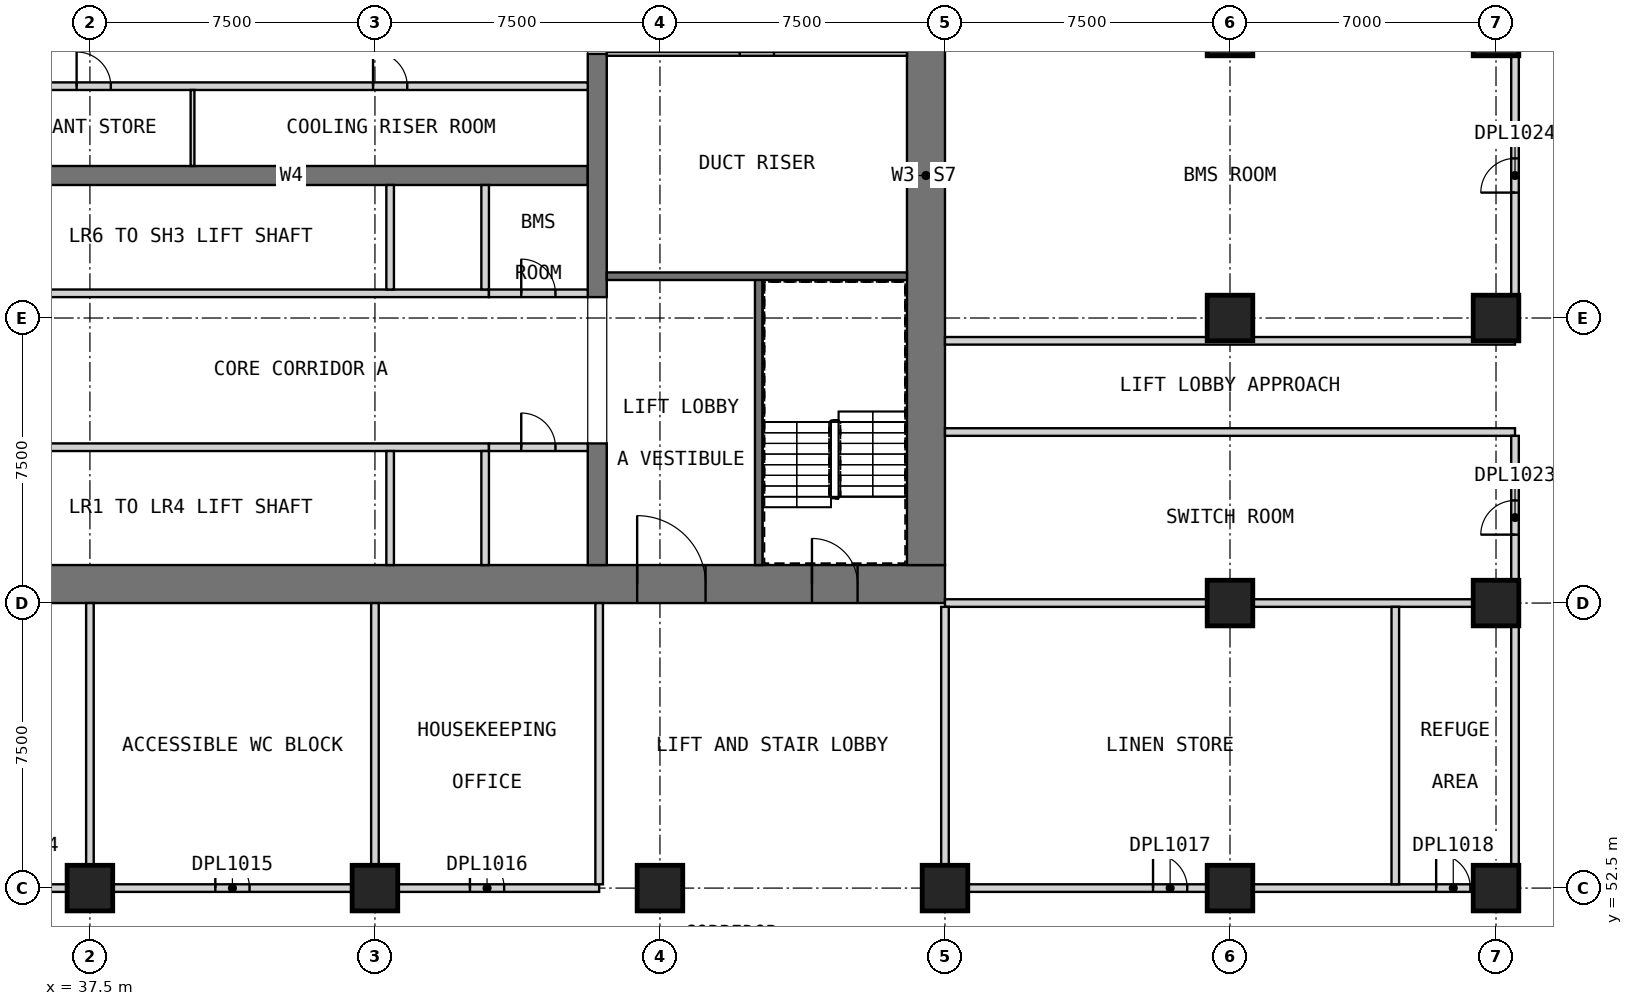
"""IFC4 building model, lengths in metres.
Left out: names, types, materials, properties, quantities, classifications, styles, units other than length and angle.
Written with IfcOpenShell. Run it as: python <this file> out.ifc"""

import sys

from ifc_helpers import new_model, si_unit, direction, frame, frame_2d, origin, origin_2d, place, context, subcontext, project, spatial, rectangle, extrude, element, fill, save


model = new_model("IFC4")
c1 = context("Model", 3, precision=1e-05, world=origin(), true_north=direction((0.0, 1.0)))
c2 = subcontext(c1, "Body", "Model", "MODEL_VIEW")
j1 = project(units=[si_unit("LENGTHUNIT", "METRE"), si_unit("PLANEANGLEUNIT", "RADIAN")], contexts=[c1])
p1 = place(None, origin())
s1 = spatial("IfcSite", under=j1, at=p1, CompositionType="ELEMENT")
p2 = place(p1, origin())
s2 = spatial("IfcBuilding", under=s1, at=p2, CompositionType="ELEMENT")
p3 = place(p2, frame((0.0, 0.0, 73.6)))
s3 = spatial("IfcBuildingStorey", under=s2, at=p3, CompositionType="ELEMENT", Elevation=73.6)
for number, where, z_axis, x_axis in (
    (1, (37.5, 52.5, 0.0), (0.0, 0.0, 1.0), (1.0, 0.0, 0.0)),
    (2, (45.0, 52.5, 0.0), (0.0, 0.0, 1.0), (1.0, 0.0, 0.0)),
    (3, (52.5, 52.5, 0.0), (0.0, 0.0, 1.0), (1.0, 0.0, 0.0)),
    (4, (60.0, 52.5, 0.0), (0.0, 0.0, 1.0), (1.0, 0.0, 0.0)),
    (5, (67.5, 52.5, 0.0), (0.0, 0.0, 1.0), (1.0, 0.0, 0.0)),
    (6, (67.5, 60.0, 0.0), (0.0, 0.0, 1.0), (1.0, 0.0, 0.0)),
    (7, (67.5, 67.5, 0.0), (0.0, 0.0, 1.0), (1.0, 0.0, 0.0)),
    (8, (67.5, 75.0, 0.0), (0.0, 0.0, 1.0), (1.0, 0.0, 0.0)),
    (9, (74.5, 52.5, 0.0), (0.0, 0.0, 1.0), (1.0, 0.0, 0.0)),
    (10, (74.5, 60.0, 0.0), (0.0, 0.0, 1.0), (1.0, 0.0, 0.0)),
    (11, (74.5, 67.5, 0.0), (0.0, 0.0, 1.0), (1.0, 0.0, 0.0)),
    (12, (74.5, 75.0, 0.0), (0.0, 0.0, 1.0), (1.0, 0.0, 0.0)),
):
    element("IfcColumn", number, at=place(p3, frame(where, z_axis=z_axis, x_axis=x_axis)), inside=s3, PredefinedType="COLUMN", context=c2, shape_type="SweptSolid", body=[
        extrude(rectangle(XDim=1.2, YDim=1.2, at=origin_2d()), origin(), (0.0, 0.0, 1.0), 5.5),
    ])
p4 = place(p3, frame((30.0, 60.5, 0.0), z_axis=(0.0, 0.0, 1.0), x_axis=(1.0, 0.0, 0.0)))
e13 = element("IfcWall", 13, at=p4, inside=s3, PredefinedType="SHEAR", context=c2, shape_type="SweptSolid", body=[
    extrude(rectangle(XDim=30.0, YDim=1.0, at=frame_2d((15.0, 0.0))), origin(), (0.0, 0.0, 1.0), 5.5),
])
p5 = place(p4, frame((21.9, 0.0, 0.0)))
e14 = element("IfcOpeningElement", 14, at=p5, cuts=e13, PredefinedType="OPENING", context=c2, shape_type="SweptSolid", body=[
    extrude(rectangle(XDim=1.8, YDim=2.1, at=frame_2d((0.9, 1.05))), frame((0.0, 0.51, 0.0), z_axis=(0.0, -1.0, 0.0), x_axis=(1.0, 0.0, 0.0)), (0.0, 0.0, 1.0), 1.02),
])
p6 = place(p4, frame((26.5, 0.0, 0.0)))
e15 = element("IfcOpeningElement", 15, at=p6, cuts=e13, PredefinedType="OPENING", context=c2, shape_type="SweptSolid", body=[
    extrude(rectangle(XDim=1.2, YDim=2.1, at=frame_2d((0.6, 1.05))), frame((0.0, 0.51, 0.0), z_axis=(0.0, -1.0, 0.0), x_axis=(1.0, 0.0, 0.0)), (0.0, 0.0, 1.0), 1.02),
])
p7 = place(p3, frame((59.5, 61.0, 0.0), z_axis=(0.0, 0.0, 1.0), x_axis=(0.0, 1.0, 0.0)))
e16 = element("IfcWall", 16, at=p7, inside=s3, PredefinedType="SHEAR", context=c2, shape_type="SweptSolid", body=[
    extrude(rectangle(XDim=20.5, YDim=1.0, at=frame_2d((10.25, 0.0))), origin(), (0.0, 0.0, 1.0), 5.5),
])
p8 = place(p7, frame((14.5, 0.0, 0.0)))
e17 = element("IfcOpeningElement", 17, at=p8, cuts=e16, PredefinedType="OPENING", context=c2, shape_type="SweptSolid", body=[
    extrude(rectangle(XDim=1.8, YDim=2.1, at=frame_2d((0.9, 1.05))), frame((0.0, 0.51, 0.0), z_axis=(0.0, -1.0, 0.0), x_axis=(1.0, 0.0, 0.0)), (0.0, 0.0, 1.0), 1.02),
])
p9 = place(p3, frame((35.0, 71.25, 0.0), z_axis=(0.0, 0.0, 1.0), x_axis=(1.0, 0.0, 0.0)))
e18 = element("IfcWall", 18, at=p9, inside=s3, PredefinedType="SHEAR", context=c2, shape_type="SweptSolid", body=[
    extrude(rectangle(XDim=15.6, YDim=0.5, at=frame_2d((7.8, 0.0))), origin(), (0.0, 0.0, 1.0), 5.5),
])
p10 = place(p3, frame((50.85, 61.0, 0.0), z_axis=(0.0, 0.0, 1.0), x_axis=(0.0, 1.0, 0.0)))
e19 = element("IfcWall", 19, at=p10, inside=s3, PredefinedType="SHEAR", context=c2, shape_type="SweptSolid", body=[
    extrude(rectangle(XDim=3.2, YDim=0.5, at=frame_2d((1.6, 0.0))), origin(), (0.0, 0.0, 1.0), 5.5),
])
p11 = place(p3, frame((50.85, 68.05, 0.0), z_axis=(0.0, 0.0, 1.0), x_axis=(0.0, 1.0, 0.0)))
e20 = element("IfcWall", 20, at=p11, inside=s3, PredefinedType="SHEAR", context=c2, shape_type="SweptSolid", body=[
    extrude(rectangle(XDim=6.4, YDim=0.5, at=frame_2d((3.2, 0.0))), origin(), (0.0, 0.0, 1.0), 5.5),
])
p12 = place(p3, frame((35.0, 64.1, 0.0), z_axis=(0.0, 0.0, 1.0), x_axis=(1.0, 0.0, 0.0)))
e21 = element("IfcWall", 21, at=p12, inside=s3, PredefinedType="SOLIDWALL", context=c2, shape_type="SweptSolid", body=[
    extrude(rectangle(XDim=13.0, YDim=0.2, at=frame_2d((6.5, 0.0))), origin(), (0.0, 0.0, 1.0), 5.5),
])
for number, where, z_axis, x_axis in (
    (22, (45.4, 61.0, 0.0), (0.0, 0.0, 1.0), (0.0, 1.0, 0.0)),
    (23, (47.9, 61.0, 0.0), (0.0, 0.0, 1.0), (0.0, 1.0, 0.0)),
):
    element("IfcWall", number, at=place(p3, frame(where, z_axis=z_axis, x_axis=x_axis)), inside=s3, PredefinedType="SOLIDWALL", context=c2, shape_type="SweptSolid", body=[
        extrude(rectangle(XDim=3.0, YDim=0.2, at=frame_2d((1.5, 0.0))), origin(), (0.0, 0.0, 1.0), 5.5),
    ])
p13 = place(p3, frame((48.0, 64.1, 0.0), z_axis=(0.0, 0.0, 1.0), x_axis=(1.0, 0.0, 0.0)))
e24 = element("IfcWall", 24, at=p13, inside=s3, PredefinedType="PARTITIONING", context=c2, shape_type="SweptSolid", body=[
    extrude(rectangle(XDim=2.6, YDim=0.2, at=frame_2d((1.3, 0.0))), origin(), (0.0, 0.0, 1.0), 5.25),
])
p14 = place(p13, frame((0.85, 0.0, 0.0)))
e25 = element("IfcOpeningElement", 25, at=p14, cuts=e24, PredefinedType="OPENING", context=c2, shape_type="SweptSolid", body=[
    extrude(rectangle(XDim=0.9, YDim=2.1, at=frame_2d((0.45, 1.05))), frame((0.0, 0.11, 0.0), z_axis=(0.0, -1.0, 0.0), x_axis=(1.0, 0.0, 0.0)), (0.0, 0.0, 1.0), 0.22),
])
p15 = place(p3, frame((35.0, 68.15, 0.0), z_axis=(0.0, 0.0, 1.0), x_axis=(1.0, 0.0, 0.0)))
e26 = element("IfcWall", 26, at=p15, inside=s3, PredefinedType="SOLIDWALL", context=c2, shape_type="SweptSolid", body=[
    extrude(rectangle(XDim=13.0, YDim=0.2, at=frame_2d((6.5, 0.0))), origin(), (0.0, 0.0, 1.0), 5.5),
])
for number, where, z_axis, x_axis in (
    (27, (45.4, 68.25, 0.0), (0.0, 0.0, 1.0), (0.0, 1.0, 0.0)),
    (28, (47.9, 68.25, 0.0), (0.0, 0.0, 1.0), (0.0, 1.0, 0.0)),
):
    element("IfcWall", number, at=place(p3, frame(where, z_axis=z_axis, x_axis=x_axis)), inside=s3, PredefinedType="SOLIDWALL", context=c2, shape_type="SweptSolid", body=[
        extrude(rectangle(XDim=2.75, YDim=0.2, at=frame_2d((1.375, 0.0))), origin(), (0.0, 0.0, 1.0), 5.5),
    ])
p16 = place(p3, frame((48.0, 68.15, 0.0), z_axis=(0.0, 0.0, 1.0), x_axis=(1.0, 0.0, 0.0)))
e29 = element("IfcWall", 29, at=p16, inside=s3, PredefinedType="PARTITIONING", context=c2, shape_type="SweptSolid", body=[
    extrude(rectangle(XDim=2.6, YDim=0.2, at=frame_2d((1.3, 0.0))), origin(), (0.0, 0.0, 1.0), 5.25),
])
p17 = place(p16, frame((0.85, 0.0, 0.0)))
e30 = element("IfcOpeningElement", 30, at=p17, cuts=e29, PredefinedType="OPENING", context=c2, shape_type="SweptSolid", body=[
    extrude(rectangle(XDim=0.9, YDim=2.1, at=frame_2d((0.45, 1.05))), frame((0.0, 0.11, 0.0), z_axis=(0.0, -1.0, 0.0), x_axis=(1.0, 0.0, 0.0)), (0.0, 0.0, 1.0), 0.22),
])
p18 = place(p3, frame((35.0, 73.6, 0.0), z_axis=(0.0, 0.0, 1.0), x_axis=(1.0, 0.0, 0.0)))
e31 = element("IfcWall", 31, at=p18, inside=s3, PredefinedType="PARTITIONING", context=c2, shape_type="SweptSolid", body=[
    extrude(rectangle(XDim=15.6, YDim=0.2, at=frame_2d((7.8, 0.0))), origin(), (0.0, 0.0, 1.0), 5.25),
])
p19 = place(p18, frame((2.15, 0.0, 0.0)))
e32 = element("IfcOpeningElement", 32, at=p19, cuts=e31, PredefinedType="OPENING", context=c2, shape_type="SweptSolid", body=[
    extrude(rectangle(XDim=0.9, YDim=2.1, at=frame_2d((0.45, 1.05))), frame((0.0, 0.11, 0.0), z_axis=(0.0, -1.0, 0.0), x_axis=(1.0, 0.0, 0.0)), (0.0, 0.0, 1.0), 0.22),
])
p20 = place(p18, frame((9.95, 0.0, 0.0)))
e33 = element("IfcOpeningElement", 33, at=p20, cuts=e31, PredefinedType="OPENING", context=c2, shape_type="SweptSolid", body=[
    extrude(rectangle(XDim=0.9, YDim=2.1, at=frame_2d((0.45, 1.05))), frame((0.0, 0.11, 0.0), z_axis=(0.0, -1.0, 0.0), x_axis=(1.0, 0.0, 0.0)), (0.0, 0.0, 1.0), 0.22),
])
p21 = place(p3, frame((40.2, 71.5, 0.0), z_axis=(0.0, 0.0, 1.0), x_axis=(0.0, 1.0, 0.0)))
e34 = element("IfcWall", 34, at=p21, inside=s3, PredefinedType="PARTITIONING", context=c2, shape_type="SweptSolid", body=[
    extrude(rectangle(XDim=2.0, YDim=0.1, at=frame_2d((1.0, 0.0))), origin(), (0.0, 0.0, 1.0), 5.25),
])
p22 = place(p3, frame((55.1, 61.0, 0.0), z_axis=(0.0, 0.0, 1.0), x_axis=(0.0, 1.0, 0.0)))
e35 = element("IfcWall", 35, at=p22, inside=s3, PredefinedType="SOLIDWALL", context=c2, shape_type="SweptSolid", body=[
    extrude(rectangle(XDim=7.6, YDim=0.2, at=frame_2d((3.8, 0.0))), origin(), (0.0, 0.0, 1.0), 5.25),
])
p23 = place(p3, frame((51.1, 68.6, 0.0), z_axis=(0.0, 0.0, 1.0), x_axis=(1.0, 0.0, 0.0)))
e36 = element("IfcWall", 36, at=p23, inside=s3, PredefinedType="SOLIDWALL", context=c2, shape_type="SweptSolid", body=[
    extrude(rectangle(XDim=7.9, YDim=0.2, at=frame_2d((3.95, 0.0))), origin(), (0.0, 0.0, 1.0), 5.25),
])
p24 = place(p3, frame((51.1, 74.45, 0.0), z_axis=(0.0, 0.0, 1.0), x_axis=(1.0, 0.0, 0.0)))
e37 = element("IfcWall", 37, at=p24, inside=s3, PredefinedType="PARTITIONING", context=c2, shape_type="SweptSolid", body=[
    extrude(rectangle(XDim=7.9, YDim=0.1, at=frame_2d((3.95, 0.0))), origin(), (0.0, 0.0, 1.0), 5.25),
])
p25 = place(p24, frame((3.5, 0.0, 0.0)))
e38 = element("IfcOpeningElement", 38, at=p25, cuts=e37, PredefinedType="OPENING", context=c2, shape_type="SweptSolid", body=[
    extrude(rectangle(XDim=0.9, YDim=2.1, at=frame_2d((0.45, 1.05))), frame((0.0, 0.06, 0.0), z_axis=(0.0, -1.0, 0.0), x_axis=(1.0, 0.0, 0.0)), (0.0, 0.0, 1.0), 0.12),
])
p26 = place(p3, frame((30.0, 52.5, 0.0), z_axis=(0.0, 0.0, 1.0), x_axis=(1.0, 0.0, 0.0)))
e39 = element("IfcWall", 39, at=p26, inside=s3, PredefinedType="PARTITIONING", context=c2, shape_type="SweptSolid", body=[
    extrude(rectangle(XDim=20.9, YDim=0.2, at=frame_2d((10.45, 0.0))), origin(), (0.0, 0.0, 1.0), 5.25),
])
p27 = place(p26, frame((5.175, 0.0, 0.0)))
e40 = element("IfcOpeningElement", 40, at=p27, cuts=e39, PredefinedType="OPENING", context=c2, shape_type="SweptSolid", body=[
    extrude(rectangle(XDim=0.9, YDim=2.1, at=frame_2d((0.45, 1.05))), frame((0.0, 0.11, 0.0), z_axis=(0.0, -1.0, 0.0), x_axis=(1.0, 0.0, 0.0)), (0.0, 0.0, 1.0), 0.22),
])
p28 = place(p26, frame((10.8, 0.0, 0.0)))
e41 = element("IfcOpeningElement", 41, at=p28, cuts=e39, PredefinedType="OPENING", context=c2, shape_type="SweptSolid", body=[
    extrude(rectangle(XDim=0.9, YDim=2.1, at=frame_2d((0.45, 1.05))), frame((0.0, 0.11, 0.0), z_axis=(0.0, -1.0, 0.0), x_axis=(1.0, 0.0, 0.0)), (0.0, 0.0, 1.0), 0.22),
])
p29 = place(p26, frame((17.5, 0.0, 0.0)))
e42 = element("IfcOpeningElement", 42, at=p29, cuts=e39, PredefinedType="OPENING", context=c2, shape_type="SweptSolid", body=[
    extrude(rectangle(XDim=0.9, YDim=2.1, at=frame_2d((0.45, 1.05))), frame((0.0, 0.11, 0.0), z_axis=(0.0, -1.0, 0.0), x_axis=(1.0, 0.0, 0.0)), (0.0, 0.0, 1.0), 0.22),
])
p30 = place(p3, frame((60.0, 52.5, 0.0), z_axis=(0.0, 0.0, 1.0), x_axis=(1.0, 0.0, 0.0)))
e43 = element("IfcWall", 43, at=p30, inside=s3, PredefinedType="PARTITIONING", context=c2, shape_type="SweptSolid", body=[
    extrude(rectangle(XDim=15.0, YDim=0.2, at=frame_2d((7.5, 0.0))), origin(), (0.0, 0.0, 1.0), 5.25),
])
p31 = place(p30, frame((5.475, 0.0, 0.0)))
e44 = element("IfcOpeningElement", 44, at=p31, cuts=e43, PredefinedType="OPENING", context=c2, shape_type="SweptSolid", body=[
    extrude(rectangle(XDim=0.9, YDim=2.1, at=frame_2d((0.45, 1.05))), frame((0.0, 0.11, 0.0), z_axis=(0.0, -1.0, 0.0), x_axis=(1.0, 0.0, 0.0)), (0.0, 0.0, 1.0), 0.22),
])
p32 = place(p30, frame((12.925, 0.0, 0.0)))
e45 = element("IfcOpeningElement", 45, at=p32, cuts=e43, PredefinedType="OPENING", context=c2, shape_type="SweptSolid", body=[
    extrude(rectangle(XDim=0.9, YDim=2.1, at=frame_2d((0.45, 1.05))), frame((0.0, 0.11, 0.0), z_axis=(0.0, -1.0, 0.0), x_axis=(1.0, 0.0, 0.0)), (0.0, 0.0, 1.0), 0.22),
])
p33 = place(p3, frame((60.0, 60.0, 0.0), z_axis=(0.0, 0.0, 1.0), x_axis=(1.0, 0.0, 0.0)))
e46 = element("IfcWall", 46, at=p33, inside=s3, PredefinedType="PARTITIONING", context=c2, shape_type="SweptSolid", body=[
    extrude(rectangle(XDim=14.9, YDim=0.2, at=frame_2d((7.45, 0.0))), origin(), (0.0, 0.0, 1.0), 5.25),
])
for number, where, z_axis, x_axis in (
    (47, (60.0, 64.5, 0.0), (0.0, 0.0, 1.0), (1.0, 0.0, 0.0)),
    (48, (60.0, 66.9, 0.0), (0.0, 0.0, 1.0), (1.0, 0.0, 0.0)),
):
    element("IfcWall", number, at=place(p3, frame(where, z_axis=z_axis, x_axis=x_axis)), inside=s3, PredefinedType="PARTITIONING", context=c2, shape_type="SweptSolid", body=[
        extrude(rectangle(XDim=15.0, YDim=0.2, at=frame_2d((7.5, 0.0))), origin(), (0.0, 0.0, 1.0), 5.25),
    ])
for number, where, z_axis, x_axis in (
    (49, (37.5, 52.6, 0.0), (0.0, 0.0, 1.0), (0.0, 1.0, 0.0)),
    (50, (45.0, 52.6, 0.0), (0.0, 0.0, 1.0), (0.0, 1.0, 0.0)),
    (51, (50.9, 52.6, 0.0), (0.0, 0.0, 1.0), (0.0, 1.0, 0.0)),
):
    element("IfcWall", number, at=place(p3, frame(where, z_axis=z_axis, x_axis=x_axis)), inside=s3, PredefinedType="PARTITIONING", context=c2, shape_type="SweptSolid", body=[
        extrude(rectangle(XDim=7.4, YDim=0.2, at=frame_2d((3.7, 0.0))), origin(), (0.0, 0.0, 1.0), 5.25),
    ])
for number, where, z_axis, x_axis in (
    (52, (60.0, 52.6, 0.0), (0.0, 0.0, 1.0), (0.0, 1.0, 0.0)),
    (53, (71.85, 52.6, 0.0), (0.0, 0.0, 1.0), (0.0, 1.0, 0.0)),
):
    element("IfcWall", number, at=place(p3, frame(where, z_axis=z_axis, x_axis=x_axis)), inside=s3, PredefinedType="PARTITIONING", context=c2, shape_type="SweptSolid", body=[
        extrude(rectangle(XDim=7.3, YDim=0.2, at=frame_2d((3.65, 0.0))), origin(), (0.0, 0.0, 1.0), 5.25),
    ])
p34 = place(p3, frame((75.0, 52.6, 0.0), z_axis=(0.0, 0.0, 1.0), x_axis=(0.0, 1.0, 0.0)))
e54 = element("IfcWall", 54, at=p34, inside=s3, PredefinedType="PARTITIONING", context=c2, shape_type="SweptSolid", body=[
    extrude(rectangle(XDim=11.8, YDim=0.2, at=frame_2d((5.9, 0.0))), origin(), (0.0, 0.0, 1.0), 5.25),
])
p35 = place(p34, frame((9.2, 0.0, 0.0)))
e55 = element("IfcOpeningElement", 55, at=p35, cuts=e54, PredefinedType="OPENING", context=c2, shape_type="SweptSolid", body=[
    extrude(rectangle(XDim=0.9, YDim=2.1, at=frame_2d((0.45, 1.05))), frame((0.0, 0.11, 0.0), z_axis=(0.0, -1.0, 0.0), x_axis=(1.0, 0.0, 0.0)), (0.0, 0.0, 1.0), 0.22),
])
p36 = place(p3, frame((75.0, 67.0, 0.0), z_axis=(0.0, 0.0, 1.0), x_axis=(0.0, 1.0, 0.0)))
e56 = element("IfcWall", 56, at=p36, inside=s3, PredefinedType="PARTITIONING", context=c2, shape_type="SweptSolid", body=[
    extrude(rectangle(XDim=8.5, YDim=0.2, at=frame_2d((4.25, 0.0))), origin(), (0.0, 0.0, 1.0), 5.25),
])
p37 = place(p36, frame((3.8, 0.0, 0.0)))
e57 = element("IfcOpeningElement", 57, at=p37, cuts=e56, PredefinedType="OPENING", context=c2, shape_type="SweptSolid", body=[
    extrude(rectangle(XDim=0.9, YDim=2.1, at=frame_2d((0.45, 1.05))), frame((0.0, 0.11, 0.0), z_axis=(0.0, -1.0, 0.0), x_axis=(1.0, 0.0, 0.0)), (0.0, 0.0, 1.0), 0.22),
])
p38 = place(p14, origin())
e58 = element("IfcDoor", 58, at=p38, inside=s3, OperationType="SINGLE_SWING_LEFT", PredefinedType="DOOR", context=c2, shape_type="SweptSolid", body=[
    extrude(rectangle(XDim=0.9, YDim=2.1, at=frame_2d((0.45, 1.05))), frame((0.0, 0.025, 0.0), z_axis=(0.0, -1.0, 0.0), x_axis=(1.0, 0.0, 0.0)), (0.0, 0.0, 1.0), 0.05),
])
fill(e25, e58)
p39 = place(p17, origin())
e59 = element("IfcDoor", 59, at=p39, inside=s3, OperationType="SINGLE_SWING_LEFT", PredefinedType="DOOR", context=c2, shape_type="SweptSolid", body=[
    extrude(rectangle(XDim=0.9, YDim=2.1, at=frame_2d((0.45, 1.05))), frame((0.0, 0.025, 0.0), z_axis=(0.0, -1.0, 0.0), x_axis=(1.0, 0.0, 0.0)), (0.0, 0.0, 1.0), 0.05),
])
fill(e30, e59)
p40 = place(p19, origin())
e60 = element("IfcDoor", 60, at=p40, inside=s3, OperationType="SINGLE_SWING_LEFT", PredefinedType="DOOR", context=c2, shape_type="SweptSolid", body=[
    extrude(rectangle(XDim=0.9, YDim=2.1, at=frame_2d((0.45, 1.05))), frame((0.0, 0.025, 0.0), z_axis=(0.0, -1.0, 0.0), x_axis=(1.0, 0.0, 0.0)), (0.0, 0.0, 1.0), 0.05),
])
fill(e32, e60)
p41 = place(p20, origin())
e61 = element("IfcDoor", 61, at=p41, inside=s3, OperationType="SINGLE_SWING_RIGHT", PredefinedType="DOOR", context=c2, shape_type="SweptSolid", body=[
    extrude(rectangle(XDim=0.9, YDim=2.1, at=frame_2d((0.45, 1.05))), frame((0.0, 0.025, 0.0), z_axis=(0.0, -1.0, 0.0), x_axis=(1.0, 0.0, 0.0)), (0.0, 0.0, 1.0), 0.05),
])
fill(e33, e61)
p42 = place(p5, origin())
e62 = element("IfcDoor", 62, at=p42, inside=s3, OperationType="DOUBLE_DOOR_SINGLE_SWING", PredefinedType="DOOR", context=c2, shape_type="SweptSolid", body=[
    extrude(rectangle(XDim=1.8, YDim=2.1, at=frame_2d((0.9, 1.05))), frame((0.0, 0.025, 0.0), z_axis=(0.0, -1.0, 0.0), x_axis=(1.0, 0.0, 0.0)), (0.0, 0.0, 1.0), 0.05),
])
fill(e14, e62)
p43 = place(p6, origin())
e63 = element("IfcDoor", 63, at=p43, inside=s3, OperationType="SINGLE_SWING_LEFT", PredefinedType="DOOR", context=c2, shape_type="SweptSolid", body=[
    extrude(rectangle(XDim=1.2, YDim=2.1, at=frame_2d((0.6, 1.05))), frame((0.0, 0.025, 0.0), z_axis=(0.0, -1.0, 0.0), x_axis=(1.0, 0.0, 0.0)), (0.0, 0.0, 1.0), 0.05),
])
fill(e15, e63)
p44 = place(p25, origin())
e64 = element("IfcDoor", 64, at=p44, inside=s3, OperationType="SINGLE_SWING_LEFT", PredefinedType="DOOR", context=c2, shape_type="SweptSolid", body=[
    extrude(rectangle(XDim=0.9, YDim=2.1, at=frame_2d((0.45, 1.05))), frame((0.0, 0.025, 0.0), z_axis=(0.0, -1.0, 0.0), x_axis=(1.0, 0.0, 0.0)), (0.0, 0.0, 1.0), 0.05),
])
fill(e38, e64)
p45 = place(p28, origin())
e65 = element("IfcDoor", 65, at=p45, inside=s3, OperationType="SINGLE_SWING_LEFT", PredefinedType="DOOR", context=c2, shape_type="SweptSolid", body=[
    extrude(rectangle(XDim=0.9, YDim=2.1, at=frame_2d((0.45, 1.05))), frame((0.0, 0.025, 0.0), z_axis=(0.0, -1.0, 0.0), x_axis=(1.0, 0.0, 0.0)), (0.0, 0.0, 1.0), 0.05),
])
fill(e41, e65)
p46 = place(p29, origin())
e66 = element("IfcDoor", 66, at=p46, inside=s3, OperationType="SINGLE_SWING_LEFT", PredefinedType="DOOR", context=c2, shape_type="SweptSolid", body=[
    extrude(rectangle(XDim=0.9, YDim=2.1, at=frame_2d((0.45, 1.05))), frame((0.0, 0.025, 0.0), z_axis=(0.0, -1.0, 0.0), x_axis=(1.0, 0.0, 0.0)), (0.0, 0.0, 1.0), 0.05),
])
fill(e42, e66)
p47 = place(p31, origin())
e67 = element("IfcDoor", 67, at=p47, inside=s3, OperationType="SINGLE_SWING_LEFT", PredefinedType="DOOR", context=c2, shape_type="SweptSolid", body=[
    extrude(rectangle(XDim=0.9, YDim=2.1, at=frame_2d((0.45, 1.05))), frame((0.0, 0.025, 0.0), z_axis=(0.0, -1.0, 0.0), x_axis=(1.0, 0.0, 0.0)), (0.0, 0.0, 1.0), 0.05),
])
fill(e44, e67)
p48 = place(p32, origin())
e68 = element("IfcDoor", 68, at=p48, inside=s3, OperationType="SINGLE_SWING_LEFT", PredefinedType="DOOR", context=c2, shape_type="SweptSolid", body=[
    extrude(rectangle(XDim=0.9, YDim=2.1, at=frame_2d((0.45, 1.05))), frame((0.0, 0.025, 0.0), z_axis=(0.0, -1.0, 0.0), x_axis=(1.0, 0.0, 0.0)), (0.0, 0.0, 1.0), 0.05),
])
fill(e45, e68)
p49 = place(p35, origin())
e69 = element("IfcDoor", 69, at=p49, inside=s3, OperationType="SINGLE_SWING_LEFT", PredefinedType="DOOR", context=c2, shape_type="SweptSolid", body=[
    extrude(rectangle(XDim=0.9, YDim=2.1, at=frame_2d((0.45, 1.05))), frame((0.0, 0.025, 0.0), z_axis=(0.0, -1.0, 0.0), x_axis=(1.0, 0.0, 0.0)), (0.0, 0.0, 1.0), 0.05),
])
fill(e55, e69)
p50 = place(p37, origin())
e70 = element("IfcDoor", 70, at=p50, inside=s3, OperationType="SINGLE_SWING_LEFT", PredefinedType="DOOR", context=c2, shape_type="SweptSolid", body=[
    extrude(rectangle(XDim=0.9, YDim=2.1, at=frame_2d((0.45, 1.05))), frame((0.0, 0.025, 0.0), z_axis=(0.0, -1.0, 0.0), x_axis=(1.0, 0.0, 0.0)), (0.0, 0.0, 1.0), 0.05),
])
fill(e57, e70)
save(model, sys.argv[1])
